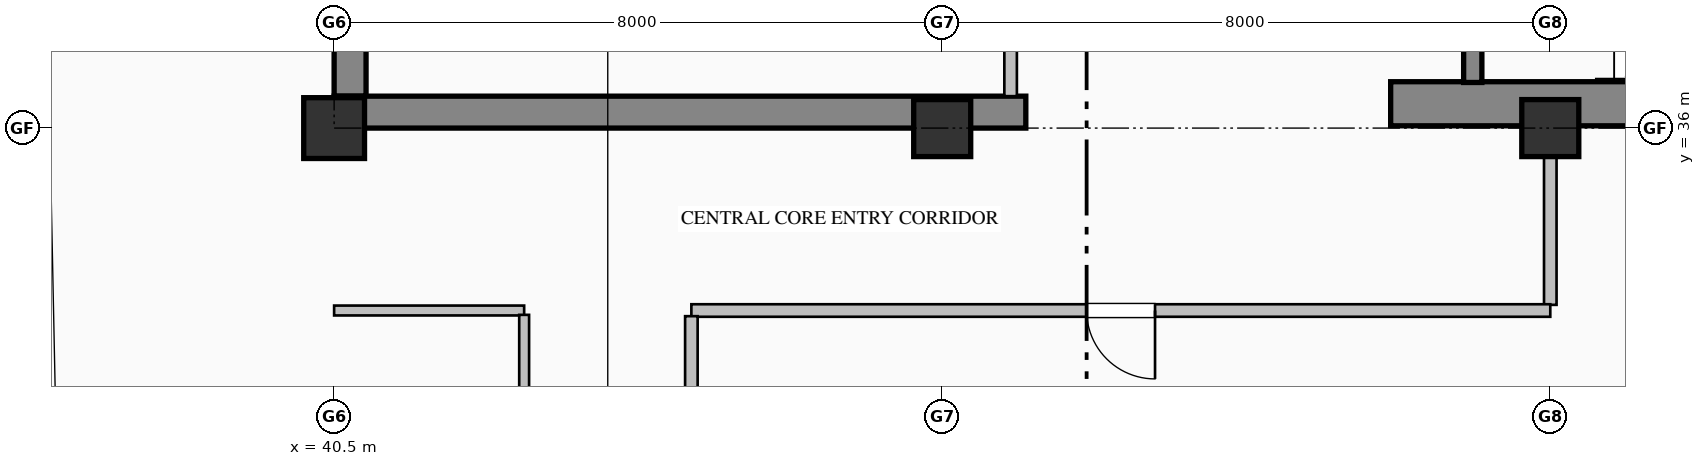
"""IFC4 building model, lengths in metres.
Left out: names, types, materials, properties, quantities, classifications, styles, units other than length and angle.
Written with IfcOpenShell. Run it as: python <this file> out.ifc"""

import sys

from ifc_helpers import new_model, si_unit, direction, frame, frame_2d, origin, origin_2d, place, context, subcontext, project, spatial, rectangle, hollow_rectangle, extrude, element, fill, save


model = new_model("IFC4")
c1 = context("Model", 3, precision=1e-05, world=origin(), true_north=direction((0.0, 1.0)))
c2 = subcontext(c1, "Body", "Model", "MODEL_VIEW")
j1 = project(units=[si_unit("LENGTHUNIT", "METRE"), si_unit("PLANEANGLEUNIT", "RADIAN")], contexts=[c1])
p1 = place(None, origin())
s1 = spatial("IfcSite", under=j1, at=p1, CompositionType="ELEMENT")
p2 = place(p1, origin())
s2 = spatial("IfcBuilding", under=s1, at=p2, CompositionType="ELEMENT")
p3 = place(p2, frame((0.0, 0.0, 363.2)))
s3 = spatial("IfcBuildingStorey", under=s2, at=p3, CompositionType="ELEMENT", Elevation=363.2)
p4 = place(p3, frame((40.71, 36.42, 0.0), z_axis=(0.0, 0.0, 1.0), x_axis=(0.0, 1.0, 0.0)))
e1 = element("IfcWall", 1, at=p4, inside=s3, PredefinedType="SHEAR", context=c2, shape_type="SweptSolid", body=[
    extrude(rectangle(XDim=7.98, YDim=0.42, at=frame_2d((3.99, 0.0))), origin(), (0.0, 0.0, 1.0), 3.58),
])
p5 = place(p3, frame((40.5, 36.21, 0.0), z_axis=(0.0, 0.0, 1.0), x_axis=(1.0, 0.0, 0.0)))
e2 = element("IfcWall", 2, at=p5, inside=s3, PredefinedType="SHEAR", context=c2, shape_type="SweptSolid", body=[
    extrude(rectangle(XDim=9.1, YDim=0.42, at=frame_2d((4.55, 0.0))), origin(), (0.0, 0.0, 1.0), 3.58),
])
p6 = place(p3, frame((54.4, 36.32, 0.0), z_axis=(0.0, 0.0, 1.0), x_axis=(1.0, 0.0, 0.0)))
e3 = element("IfcWall", 3, at=p6, inside=s3, PredefinedType="SHEAR", context=c2, shape_type="SweptSolid", body=[
    extrude(rectangle(XDim=9.6, YDim=0.58, at=frame_2d((4.8, 0.0))), origin(), (0.0, 0.0, 1.0), 4.0),
])
p7 = place(p3, frame((40.5, 36.0, 0.0), z_axis=(0.0, 0.0, 1.0), x_axis=(1.0, 0.0, 0.0)))
e4 = element("IfcColumn", 4, at=p7, inside=s3, PredefinedType="COLUMN", context=c2, shape_type="SweptSolid", body=[
    extrude(hollow_rectangle(XDim=0.8, YDim=0.8, WallThickness=0.032, at=origin_2d()), origin(), (0.0, 0.0, 1.0), 4.0),
])
for number, where, z_axis, x_axis in (
    (5, (48.5, 36.0, 0.0), (0.0, 0.0, 1.0), (1.0, 0.0, 0.0)),
    (6, (56.5, 36.0, 0.0), (0.0, 0.0, 1.0), (1.0, 0.0, 0.0)),
):
    element("IfcColumn", number, at=place(p3, frame(where, z_axis=z_axis, x_axis=x_axis)), inside=s3, PredefinedType="COLUMN", context=c2, shape_type="SweptSolid", body=[
        extrude(rectangle(XDim=0.75, YDim=0.75, at=origin_2d()), origin(), (0.0, 0.0, 1.0), 4.0),
    ])
p8 = place(p3, frame((55.48, 39.75, 0.0), z_axis=(0.0, 0.0, 1.0), x_axis=(0.0, -1.0, 0.0)))
e7 = element("IfcWall", 7, at=p8, inside=s3, PredefinedType="SOLIDWALL", context=c2, shape_type="SweptSolid", body=[
    extrude(rectangle(XDim=3.15, YDim=0.24, at=frame_2d((1.575, 0.0))), origin(), (0.0, 0.0, 1.0), 4.0),
])
p9 = place(p8, frame((1.0, 0.0, 0.0)))
e8 = element("IfcOpeningElement", 8, at=p9, cuts=e7, PredefinedType="OPENING", context=c2, shape_type="SweptSolid", body=[
    extrude(rectangle(XDim=1.15, YDim=2.2, at=frame_2d((0.575, 1.1))), frame((0.0, 0.13, 0.0), z_axis=(0.0, -1.0, 0.0), x_axis=(1.0, 0.0, 0.0)), (0.0, 0.0, 1.0), 0.26),
])
p10 = place(p3, frame((49.4, 36.42, 0.0), z_axis=(0.0, 0.0, 1.0), x_axis=(0.0, 1.0, 0.0)))
e9 = element("IfcWall", 9, at=p10, inside=s3, PredefinedType="PARTITIONING", context=c2, shape_type="SweptSolid", body=[
    extrude(rectangle(XDim=7.73, YDim=0.165, at=frame_2d((3.865, 0.0))), origin(), (0.0, 0.0, 1.0), 2.822),
])
p11 = place(p10, frame((3.365, 0.0, 0.0)))
e10 = element("IfcOpeningElement", 10, at=p11, cuts=e9, PredefinedType="OPENING", context=c2, shape_type="SweptSolid", body=[
    extrude(rectangle(XDim=1.0, YDim=2.15, at=frame_2d((0.5, 1.075))), frame((0.0, 0.093, 0.0), z_axis=(0.0, -1.0, 0.0), x_axis=(1.0, 0.0, 0.0)), (0.0, 0.0, 1.0), 0.185),
])
p12 = place(p3, frame((56.5, 36.0, 0.0), z_axis=(0.0, 0.0, 1.0), x_axis=(0.0, -1.0, 0.0)))
e11 = element("IfcWall", 11, at=p12, inside=s3, PredefinedType="PARTITIONING", context=c2, shape_type="SweptSolid", body=[
    extrude(rectangle(XDim=2.325, YDim=0.165, at=frame_2d((1.163, 0.0))), origin(), (0.0, 0.0, 1.0), 2.972),
])
p13 = place(p3, frame((56.5, 33.6, 0.0), z_axis=(0.0, 0.0, 1.0), x_axis=(-1.0, 0.0, 0.0)))
e12 = element("IfcWall", 12, at=p13, inside=s3, PredefinedType="PARTITIONING", context=c2, shape_type="SweptSolid", body=[
    extrude(rectangle(XDim=11.3, YDim=0.165, at=frame_2d((5.65, 0.0))), origin(), (0.0, 0.0, 1.0), 3.58),
])
p14 = place(p13, frame((5.2, 0.0, 0.0)))
e13 = element("IfcOpeningElement", 13, at=p14, cuts=e12, PredefinedType="OPENING", context=c2, shape_type="SweptSolid", body=[
    extrude(rectangle(XDim=0.9, YDim=2.15, at=frame_2d((0.45, 1.075))), frame((0.0, 0.093, 0.0), z_axis=(0.0, -1.0, 0.0), x_axis=(1.0, 0.0, 0.0)), (0.0, 0.0, 1.0), 0.185),
])
p15 = place(p3, frame((43.0, 33.6, 0.0), z_axis=(0.0, 0.0, 1.0), x_axis=(-1.0, 0.0, 0.0)))
e14 = element("IfcWall", 14, at=p15, inside=s3, PredefinedType="PARTITIONING", context=c2, shape_type="SweptSolid", body=[
    extrude(rectangle(XDim=2.5, YDim=0.13, at=frame_2d((1.25, 0.0))), origin(), (0.0, 0.0, 1.0), 3.58),
])
p16 = place(p3, frame((45.2, 33.525, 0.0), z_axis=(0.0, 0.0, 1.0), x_axis=(0.0, -1.0, 0.0)))
e15 = element("IfcWall", 15, at=p16, inside=s3, PredefinedType="PARTITIONING", context=c2, shape_type="SweptSolid", body=[
    extrude(rectangle(XDim=1.091, YDim=0.165, at=frame_2d((0.545, 0.0))), origin(), (0.0, 0.0, 1.0), 3.58),
])
p17 = place(p3, frame((43.0, 22.875, 0.0), z_axis=(0.0, 0.0, 1.0), x_axis=(0.0, 1.0, 0.0)))
e16 = element("IfcWall", 16, at=p17, inside=s3, PredefinedType="PARTITIONING", context=c2, shape_type="SweptSolid", body=[
    extrude(rectangle(XDim=10.668, YDim=0.13, at=frame_2d((5.334, 0.0))), origin(), (0.0, 0.0, 1.0), 3.58),
])
p18 = place(p17, frame((4.834, 0.0, 0.0)))
e17 = element("IfcOpeningElement", 17, at=p18, cuts=e16, PredefinedType="OPENING", context=c2, shape_type="SweptSolid", body=[
    extrude(rectangle(XDim=1.0, YDim=2.15, at=frame_2d((0.5, 1.075))), frame((0.0, 0.075, 0.0), z_axis=(0.0, -1.0, 0.0), x_axis=(1.0, 0.0, 0.0)), (0.0, 0.0, 1.0), 0.15),
])
p19 = place(p14, origin())
e18 = element("IfcDoor", 18, at=p19, inside=s3, OperationType="SINGLE_SWING_LEFT", PredefinedType="DOOR", context=c2, shape_type="SweptSolid", body=[
    extrude(rectangle(XDim=0.9, YDim=2.15, at=frame_2d((0.45, 1.075))), frame((0.0, 0.025, 0.0), z_axis=(0.0, -1.0, 0.0), x_axis=(1.0, 0.0, 0.0)), (0.0, 0.0, 1.0), 0.05),
])
fill(e13, e18)
save(model, sys.argv[1])
